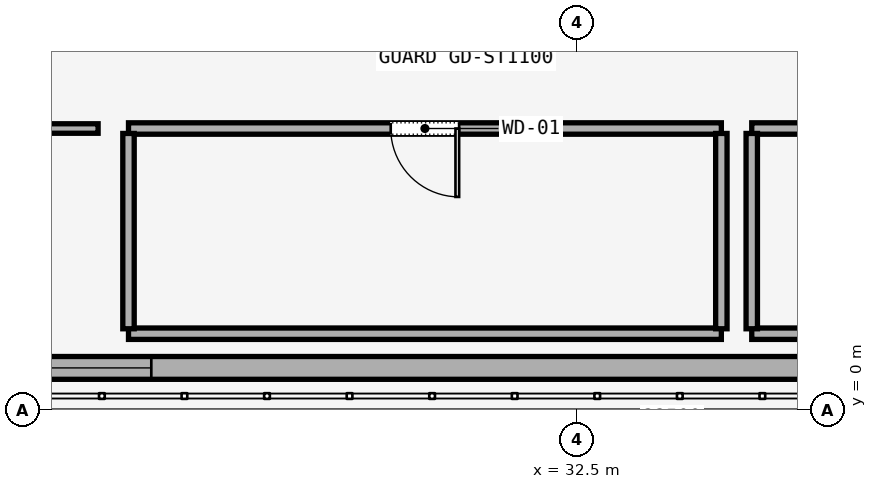
"""IFC4 building model, lengths in metres.
Left out: names, types, materials, properties, quantities, classifications, styles, units other than length and angle.
Written with IfcOpenShell. Run it as: python <this file> out.ifc"""

import sys

from ifc_helpers import new_model, si_unit, direction, frame, frame_2d, origin, place, context, subcontext, project, spatial, rectangle, extrude, element, fill, save


model = new_model("IFC4")
c1 = context("Model", 3, precision=1e-05, world=origin(), true_north=direction((0.0, 1.0)))
c2 = subcontext(c1, "Body", "Model", "MODEL_VIEW")
j1 = project(units=[si_unit("LENGTHUNIT", "METRE"), si_unit("PLANEANGLEUNIT", "RADIAN")], contexts=[c1])
p1 = place(None, origin())
s1 = spatial("IfcSite", under=j1, at=p1, CompositionType="ELEMENT")
p2 = place(p1, origin())
s2 = spatial("IfcBuilding", under=s1, at=p2, CompositionType="ELEMENT")
p3 = place(p2, frame((0.0, 0.0, 6.0)))
s3 = spatial("IfcBuildingStorey", under=s2, at=p3, CompositionType="ELEMENT", Elevation=6.0)
p4 = place(p3, frame((2.3, 0.55, 0.0), z_axis=(0.0, 0.0, 1.0), x_axis=(1.0, 0.0, 0.0)))
e1 = element("IfcWall", 1, at=p4, inside=s3, PredefinedType="SOLIDWALL", context=c2, shape_type="SweptSolid", body=[
    extrude(rectangle(XDim=79.4, YDim=0.3, at=frame_2d((39.7, 0.0))), origin(), (0.0, 0.0, 1.0), 5.7),
])
p5 = place(p4, frame((5.8, 0.0, 1.0)))
e2 = element("IfcOpeningElement", 2, at=p5, cuts=e1, PredefinedType="OPENING", context=c2, shape_type="SweptSolid", body=[
    extrude(rectangle(XDim=1.8, YDim=2.2, at=frame_2d((0.9, 1.1))), frame((0.0, 0.15, 0.0), z_axis=(0.0, -1.0, 0.0), x_axis=(1.0, 0.0, 0.0)), (0.0, 0.0, 1.0), 0.3),
])
p6 = place(p4, frame((12.6, 0.0, 1.0)))
e3 = element("IfcOpeningElement", 3, at=p6, cuts=e1, PredefinedType="OPENING", context=c2, shape_type="SweptSolid", body=[
    extrude(rectangle(XDim=1.8, YDim=2.2, at=frame_2d((0.9, 1.1))), frame((0.0, 0.15, 0.0), z_axis=(0.0, -1.0, 0.0), x_axis=(1.0, 0.0, 0.0)), (0.0, 0.0, 1.0), 0.3),
])
p7 = place(p4, frame((22.8, 0.0, 1.0)))
e4 = element("IfcOpeningElement", 4, at=p7, cuts=e1, PredefinedType="OPENING", context=c2, shape_type="SweptSolid", body=[
    extrude(rectangle(XDim=1.8, YDim=2.2, at=frame_2d((0.9, 1.1))), frame((0.0, 0.15, 0.0), z_axis=(0.0, -1.0, 0.0), x_axis=(1.0, 0.0, 0.0)), (0.0, 0.0, 1.0), 0.3),
])
p8 = place(p4, frame((33.2, 0.0, 1.0)))
e5 = element("IfcOpeningElement", 5, at=p8, cuts=e1, PredefinedType="OPENING", context=c2, shape_type="SweptSolid", body=[
    extrude(rectangle(XDim=1.8, YDim=2.2, at=frame_2d((0.9, 1.1))), frame((0.0, 0.15, 0.0), z_axis=(0.0, -1.0, 0.0), x_axis=(1.0, 0.0, 0.0)), (0.0, 0.0, 1.0), 0.3),
])
p9 = place(p4, frame((44.8, 0.0, 1.0)))
e6 = element("IfcOpeningElement", 6, at=p9, cuts=e1, PredefinedType="OPENING", context=c2, shape_type="SweptSolid", body=[
    extrude(rectangle(XDim=1.8, YDim=2.2, at=frame_2d((0.9, 1.1))), frame((0.0, 0.15, 0.0), z_axis=(0.0, -1.0, 0.0), x_axis=(1.0, 0.0, 0.0)), (0.0, 0.0, 1.0), 0.3),
])
p10 = place(p4, frame((55.2, 0.0, 1.0)))
e7 = element("IfcOpeningElement", 7, at=p10, cuts=e1, PredefinedType="OPENING", context=c2, shape_type="SweptSolid", body=[
    extrude(rectangle(XDim=1.8, YDim=2.2, at=frame_2d((0.9, 1.1))), frame((0.0, 0.15, 0.0), z_axis=(0.0, -1.0, 0.0), x_axis=(1.0, 0.0, 0.0)), (0.0, 0.0, 1.0), 0.3),
])
p11 = place(p4, frame((66.4, 0.0, 1.0)))
e8 = element("IfcOpeningElement", 8, at=p11, cuts=e1, PredefinedType="OPENING", context=c2, shape_type="SweptSolid", body=[
    extrude(rectangle(XDim=1.8, YDim=2.2, at=frame_2d((0.9, 1.1))), frame((0.0, 0.15, 0.0), z_axis=(0.0, -1.0, 0.0), x_axis=(1.0, 0.0, 0.0)), (0.0, 0.0, 1.0), 0.3),
])
p12 = place(p4, frame((73.0, 0.0, 1.0)))
e9 = element("IfcOpeningElement", 9, at=p12, cuts=e1, PredefinedType="OPENING", context=c2, shape_type="SweptSolid", body=[
    extrude(rectangle(XDim=1.8, YDim=2.2, at=frame_2d((0.9, 1.1))), frame((0.0, 0.15, 0.0), z_axis=(0.0, -1.0, 0.0), x_axis=(1.0, 0.0, 0.0)), (0.0, 0.0, 1.0), 0.3),
])
p13 = place(p3, frame((42.6, 3.7, 0.0), z_axis=(0.0, 0.0, 1.0), x_axis=(-1.0, 0.0, 0.0)))
e10 = element("IfcWall", 10, at=p13, inside=s3, PredefinedType="PARTITIONING", context=c2, shape_type="SweptSolid", body=[
    extrude(rectangle(XDim=7.8, YDim=0.15, at=frame_2d((3.9, 0.0))), origin(), (0.0, 0.0, 1.0), 4.819),
])
p14 = place(p13, frame((3.45, 0.0, 0.0)))
e11 = element("IfcOpeningElement", 11, at=p14, cuts=e10, PredefinedType="OPENING", context=c2, shape_type="SweptSolid", body=[
    extrude(rectangle(XDim=0.9, YDim=2.15, at=frame_2d((0.45, 1.075))), frame((0.0, 0.075, 0.0), z_axis=(0.0, -1.0, 0.0), x_axis=(1.0, 0.0, 0.0)), (0.0, 0.0, 1.0), 0.15),
])
p15 = place(p3, frame((34.4, 3.7, 0.0), z_axis=(0.0, 0.0, 1.0), x_axis=(-1.0, 0.0, 0.0)))
e12 = element("IfcWall", 12, at=p15, inside=s3, PredefinedType="PARTITIONING", context=c2, shape_type="SweptSolid", body=[
    extrude(rectangle(XDim=7.8, YDim=0.15, at=frame_2d((3.9, 0.0))), origin(), (0.0, 0.0, 1.0), 4.819),
])
p16 = place(p15, frame((3.45, 0.0, 0.0)))
e13 = element("IfcOpeningElement", 13, at=p16, cuts=e12, PredefinedType="OPENING", context=c2, shape_type="SweptSolid", body=[
    extrude(rectangle(XDim=0.9, YDim=2.15, at=frame_2d((0.45, 1.075))), frame((0.0, 0.075, 0.0), z_axis=(0.0, -1.0, 0.0), x_axis=(1.0, 0.0, 0.0)), (0.0, 0.0, 1.0), 0.15),
])
p17 = place(p3, frame((26.2, 3.7, 0.0), z_axis=(0.0, 0.0, 1.0), x_axis=(-1.0, 0.0, 0.0)))
e14 = element("IfcWall", 14, at=p17, inside=s3, PredefinedType="PARTITIONING", context=c2, shape_type="SweptSolid", body=[
    extrude(rectangle(XDim=2.2, YDim=0.125, at=frame_2d((1.1, 0.0))), origin(), (0.0, 0.0, 1.0), 4.819),
])
p18 = place(p3, frame((34.4, 1.0, 0.0), z_axis=(0.0, 0.0, 1.0), x_axis=(-1.0, 0.0, 0.0)))
e15 = element("IfcWall", 15, at=p18, inside=s3, PredefinedType="PARTITIONING", context=c2, shape_type="SweptSolid", body=[
    extrude(rectangle(XDim=7.8, YDim=0.15, at=frame_2d((3.9, 0.0))), origin(), (0.0, 0.0, 1.0), 4.819),
])
for number, where, z_axis, x_axis in (
    (16, (26.6, 1.065, 0.0), (0.0, 0.0, 1.0), (0.0, 1.0, 0.0)),
    (17, (34.4, 3.635, 0.0), (0.0, 0.0, 1.0), (0.0, -1.0, 0.0)),
):
    element("IfcWall", number, at=place(p3, frame(where, z_axis=z_axis, x_axis=x_axis)), inside=s3, PredefinedType="PARTITIONING", context=c2, shape_type="SweptSolid", body=[
        extrude(rectangle(XDim=2.57, YDim=0.15, at=frame_2d((1.285, 0.0))), origin(), (0.0, 0.0, 1.0), 4.819),
    ])
p19 = place(p3, frame((42.6, 1.0, 0.0), z_axis=(0.0, 0.0, 1.0), x_axis=(-1.0, 0.0, 0.0)))
e18 = element("IfcWall", 18, at=p19, inside=s3, PredefinedType="PARTITIONING", context=c2, shape_type="SweptSolid", body=[
    extrude(rectangle(XDim=7.8, YDim=0.15, at=frame_2d((3.9, 0.0))), origin(), (0.0, 0.0, 1.0), 4.819),
])
p20 = place(p3, frame((34.8, 1.065, 0.0), z_axis=(0.0, 0.0, 1.0), x_axis=(0.0, 1.0, 0.0)))
e19 = element("IfcWall", 19, at=p20, inside=s3, PredefinedType="PARTITIONING", context=c2, shape_type="SweptSolid", body=[
    extrude(rectangle(XDim=2.57, YDim=0.15, at=frame_2d((1.285, 0.0))), origin(), (0.0, 0.0, 1.0), 4.819),
])
p21 = place(p7, origin())
e20 = element("IfcWindow", 20, at=p21, inside=s3, PartitioningType="SINGLE_PANEL", PredefinedType="WINDOW", context=c2, shape_type="SweptSolid", body=[
    extrude(rectangle(XDim=1.8, YDim=2.2, at=frame_2d((0.9, 1.1))), frame((0.0, 0.03, 0.0), z_axis=(0.0, -1.0, 0.0), x_axis=(1.0, 0.0, 0.0)), (0.0, 0.0, 1.0), 0.06),
])
fill(e4, e20)
p22 = place(p16, origin())
e21 = element("IfcDoor", 21, at=p22, inside=s3, OperationType="SINGLE_SWING_RIGHT", PredefinedType="DOOR", context=c2, shape_type="SweptSolid", body=[
    extrude(rectangle(XDim=0.9, YDim=2.15, at=frame_2d((0.45, 1.075))), frame((0.0, 0.025, 0.0), z_axis=(0.0, -1.0, 0.0), x_axis=(1.0, 0.0, 0.0)), (0.0, 0.0, 1.0), 0.05),
])
fill(e13, e21)
save(model, sys.argv[1])
